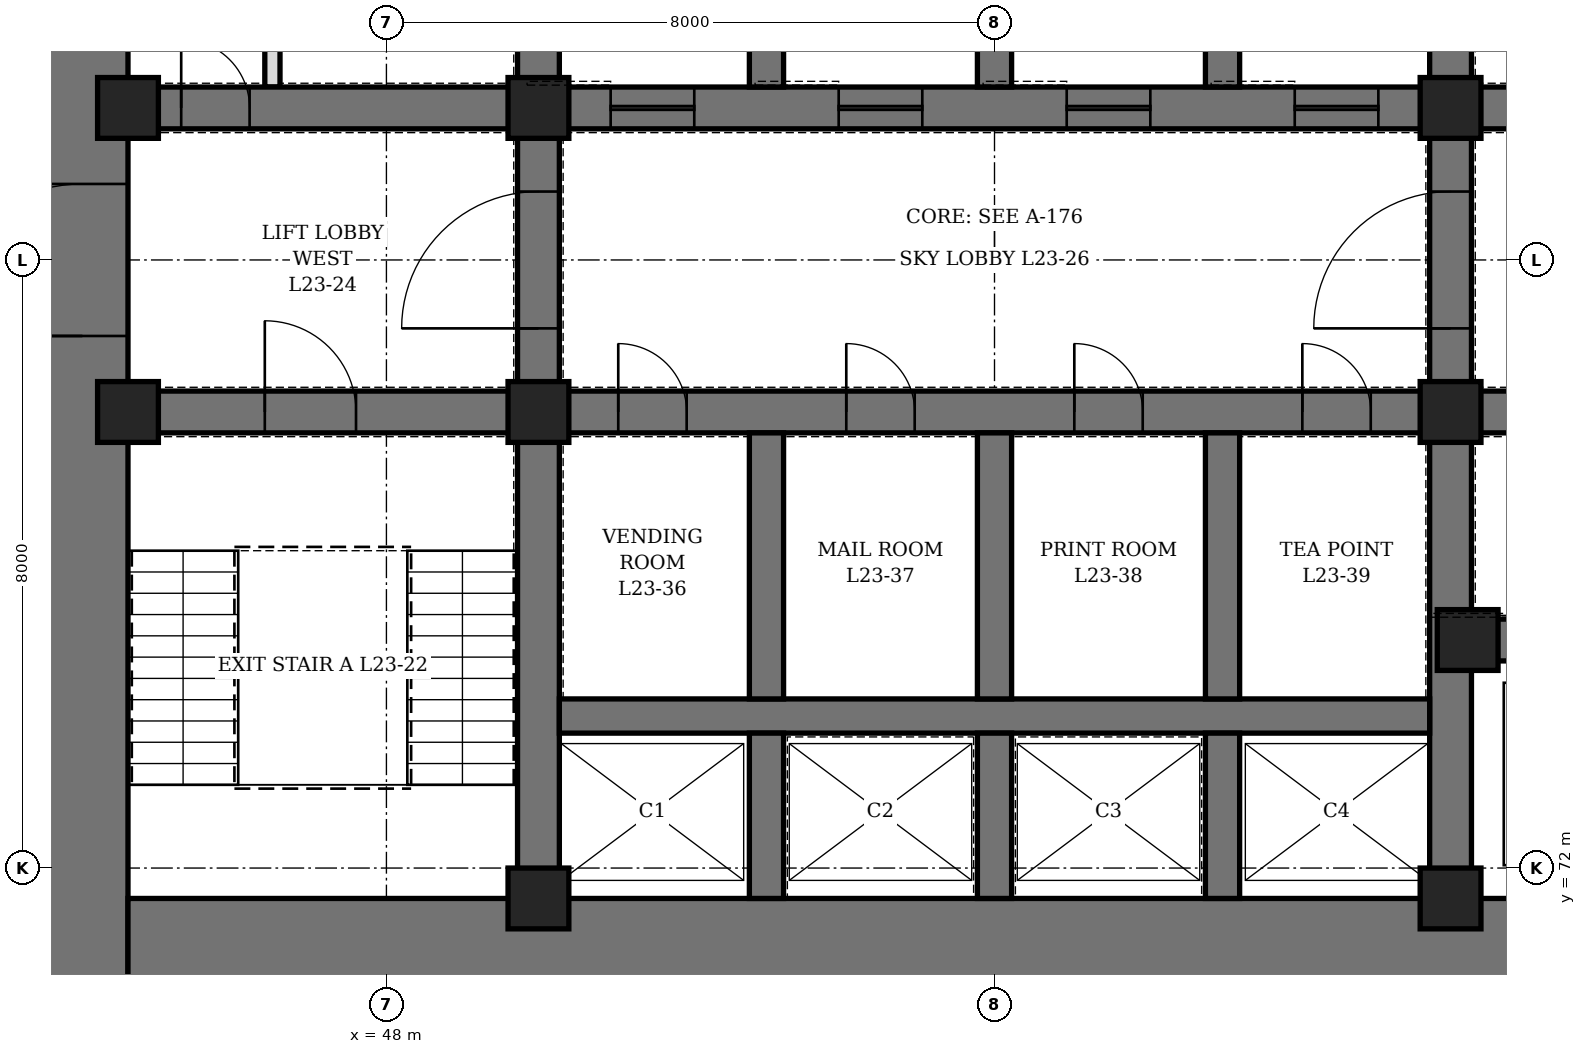
"""IFC4 building model, lengths in metres.
Left out: names, types, materials, properties, quantities, classifications, styles, units other than length and angle.
Written with IfcOpenShell. Run it as: python <this file> out.ifc"""

import sys

from ifc_helpers import new_model, si_unit, direction, frame, frame_2d, origin, origin_2d, place, context, subcontext, project, spatial, rectangle, hollow_rectangle, extrude, element, fill, save


model = new_model("IFC4")
c1 = context("Model", 3, precision=1e-05, world=origin(), true_north=direction((0.0, 1.0)))
c2 = subcontext(c1, "Body", "Model", "MODEL_VIEW")
j1 = project(units=[si_unit("LENGTHUNIT", "METRE"), si_unit("PLANEANGLEUNIT", "RADIAN")], contexts=[c1])
p1 = place(None, origin())
s1 = spatial("IfcSite", under=j1, at=p1, CompositionType="ELEMENT")
p2 = place(p1, origin())
s2 = spatial("IfcBuilding", under=s1, at=p2, CompositionType="ELEMENT")
p3 = place(p2, frame((0.0, 0.0, 108.1)))
s3 = spatial("IfcBuildingStorey", under=s2, at=p3, CompositionType="ELEMENT", Elevation=108.1)
p4 = place(p3, frame((44.0, 70.4, 0.0), z_axis=(0.0, 0.0, 1.0), x_axis=(0.0, 1.0, 0.0)))
e1 = element("IfcWall", 1, at=p4, inside=s3, PredefinedType="SHEAR", context=c2, shape_type="SweptSolid", body=[
    extrude(rectangle(XDim=19.2, YDim=1.2, at=frame_2d((9.6, 0.0))), origin(), (0.0, 0.0, 1.0), 4.2),
])
p5 = place(p4, frame((8.6, 0.0, 0.0)))
e2 = element("IfcOpeningElement", 2, at=p5, cuts=e1, PredefinedType="OPENING", context=c2, shape_type="SweptSolid", body=[
    extrude(rectangle(XDim=2.0, YDim=2.4, at=frame_2d((1.0, 1.2))), frame((0.0, 0.61, 0.0), z_axis=(0.0, -1.0, 0.0), x_axis=(1.0, 0.0, 0.0)), (0.0, 0.0, 1.0), 1.22),
])
p6 = place(p3, frame((44.6, 71.0, 0.0), z_axis=(0.0, 0.0, 1.0), x_axis=(1.0, 0.0, 0.0)))
e3 = element("IfcWall", 3, at=p6, inside=s3, PredefinedType="SHEAR", context=c2, shape_type="SweptSolid", body=[
    extrude(rectangle(XDim=22.8, YDim=1.2, at=frame_2d((11.4, 0.0))), origin(), (0.0, 0.0, 1.0), 4.2),
])
p7 = place(p3, frame((50.0, 71.6, 0.0), z_axis=(0.0, 0.0, 1.0), x_axis=(0.0, 1.0, 0.0)))
e4 = element("IfcWall", 4, at=p7, inside=s3, PredefinedType="SHEAR", context=c2, shape_type="SweptSolid", body=[
    extrude(rectangle(XDim=16.8, YDim=0.55, at=frame_2d((8.4, 0.0))), origin(), (0.0, 0.0, 1.0), 4.2),
])
p8 = place(p7, frame((7.5, 0.0, 0.0)))
e5 = element("IfcOpeningElement", 5, at=p8, cuts=e4, PredefinedType="OPENING", context=c2, shape_type="SweptSolid", body=[
    extrude(rectangle(XDim=1.8, YDim=2.4, at=frame_2d((0.9, 1.2))), frame((0.0, 0.285, 0.0), z_axis=(0.0, -1.0, 0.0), x_axis=(1.0, 0.0, 0.0)), (0.0, 0.0, 1.0), 0.57),
])
p9 = place(p3, frame((62.0, 71.6, 0.0), z_axis=(0.0, 0.0, 1.0), x_axis=(0.0, 1.0, 0.0)))
e6 = element("IfcWall", 6, at=p9, inside=s3, PredefinedType="SHEAR", context=c2, shape_type="SweptSolid", body=[
    extrude(rectangle(XDim=16.8, YDim=0.55, at=frame_2d((8.4, 0.0))), origin(), (0.0, 0.0, 1.0), 4.2),
])
p10 = place(p9, frame((7.5, 0.0, 0.0)))
e7 = element("IfcOpeningElement", 7, at=p10, cuts=e6, PredefinedType="OPENING", context=c2, shape_type="SweptSolid", body=[
    extrude(rectangle(XDim=1.8, YDim=2.4, at=frame_2d((0.9, 1.2))), frame((0.0, 0.285, 0.0), z_axis=(0.0, -1.0, 0.0), x_axis=(1.0, 0.0, 0.0)), (0.0, 0.0, 1.0), 0.57),
])
p11 = place(p3, frame((44.6, 78.0, 0.0), z_axis=(0.0, 0.0, 1.0), x_axis=(1.0, 0.0, 0.0)))
e8 = element("IfcWall", 8, at=p11, inside=s3, PredefinedType="SHEAR", context=c2, shape_type="SweptSolid", body=[
    extrude(rectangle(XDim=5.125, YDim=0.55, at=frame_2d((2.562, 0.0))), origin(), (0.0, 0.0, 1.0), 4.2),
])
p12 = place(p11, frame((1.8, 0.0, 0.0)))
e9 = element("IfcOpeningElement", 9, at=p12, cuts=e8, PredefinedType="OPENING", context=c2, shape_type="SweptSolid", body=[
    extrude(rectangle(XDim=1.2, YDim=2.1, at=frame_2d((0.6, 1.05))), frame((0.0, 0.285, 0.0), z_axis=(0.0, -1.0, 0.0), x_axis=(1.0, 0.0, 0.0)), (0.0, 0.0, 1.0), 0.57),
])
p13 = place(p3, frame((44.6, 82.0, 0.0), z_axis=(0.0, 0.0, 1.0), x_axis=(1.0, 0.0, 0.0)))
e10 = element("IfcWall", 10, at=p13, inside=s3, PredefinedType="SHEAR", context=c2, shape_type="SweptSolid", body=[
    extrude(rectangle(XDim=5.125, YDim=0.55, at=frame_2d((2.562, 0.0))), origin(), (0.0, 0.0, 1.0), 4.2),
])
p14 = place(p13, frame((0.7, 0.0, 0.0)))
e11 = element("IfcOpeningElement", 11, at=p14, cuts=e10, PredefinedType="OPENING", context=c2, shape_type="SweptSolid", body=[
    extrude(rectangle(XDim=0.9, YDim=2.1, at=frame_2d((0.45, 1.05))), frame((0.0, 0.285, 0.0), z_axis=(0.0, -1.0, 0.0), x_axis=(1.0, 0.0, 0.0)), (0.0, 0.0, 1.0), 0.57),
])
p15 = place(p3, frame((62.275, 75.0, 0.0), z_axis=(0.0, 0.0, 1.0), x_axis=(1.0, 0.0, 0.0)))
e12 = element("IfcWall", 12, at=p15, inside=s3, PredefinedType="SHEAR", context=c2, shape_type="SweptSolid", body=[
    extrude(rectangle(XDim=5.125, YDim=0.55, at=frame_2d((2.562, 0.0))), origin(), (0.0, 0.0, 1.0), 4.2),
])
p16 = place(p15, frame((0.625, 0.0, 0.0)))
e13 = element("IfcOpeningElement", 13, at=p16, cuts=e12, PredefinedType="OPENING", context=c2, shape_type="SweptSolid", body=[
    extrude(rectangle(XDim=1.2, YDim=2.2, at=frame_2d((0.6, 1.1))), frame((0.0, 0.285, 0.0), z_axis=(0.0, -1.0, 0.0), x_axis=(1.0, 0.0, 0.0)), (0.0, 0.0, 1.0), 0.57),
])
p17 = place(p15, frame((3.375, 0.0, 0.0)))
e14 = element("IfcOpeningElement", 14, at=p17, cuts=e12, PredefinedType="OPENING", context=c2, shape_type="SweptSolid", body=[
    extrude(rectangle(XDim=1.2, YDim=2.2, at=frame_2d((0.6, 1.1))), frame((0.0, 0.285, 0.0), z_axis=(0.0, -1.0, 0.0), x_axis=(1.0, 0.0, 0.0)), (0.0, 0.0, 1.0), 0.57),
])
p18 = place(p3, frame((62.275, 78.0, 0.0), z_axis=(0.0, 0.0, 1.0), x_axis=(1.0, 0.0, 0.0)))
e15 = element("IfcWall", 15, at=p18, inside=s3, PredefinedType="SHEAR", context=c2, shape_type="SweptSolid", body=[
    extrude(rectangle(XDim=5.125, YDim=0.55, at=frame_2d((2.562, 0.0))), origin(), (0.0, 0.0, 1.0), 4.2),
])
p19 = place(p18, frame((2.125, 0.0, 0.0)))
e16 = element("IfcOpeningElement", 16, at=p19, cuts=e15, PredefinedType="OPENING", context=c2, shape_type="SweptSolid", body=[
    extrude(rectangle(XDim=1.2, YDim=2.1, at=frame_2d((0.6, 1.05))), frame((0.0, 0.285, 0.0), z_axis=(0.0, -1.0, 0.0), x_axis=(1.0, 0.0, 0.0)), (0.0, 0.0, 1.0), 0.57),
])
p20 = place(p3, frame((62.275, 82.0, 0.0), z_axis=(0.0, 0.0, 1.0), x_axis=(1.0, 0.0, 0.0)))
e17 = element("IfcWall", 17, at=p20, inside=s3, PredefinedType="SHEAR", context=c2, shape_type="SweptSolid", body=[
    extrude(rectangle(XDim=5.125, YDim=0.55, at=frame_2d((2.562, 0.0))), origin(), (0.0, 0.0, 1.0), 4.2),
])
p21 = place(p20, frame((2.125, 0.0, 0.0)))
e18 = element("IfcOpeningElement", 18, at=p21, cuts=e17, PredefinedType="OPENING", context=c2, shape_type="SweptSolid", body=[
    extrude(rectangle(XDim=1.2, YDim=2.1, at=frame_2d((0.6, 1.05))), frame((0.0, 0.285, 0.0), z_axis=(0.0, -1.0, 0.0), x_axis=(1.0, 0.0, 0.0)), (0.0, 0.0, 1.0), 0.57),
])
p22 = place(p3, frame((50.275, 78.0, 0.0), z_axis=(0.0, 0.0, 1.0), x_axis=(1.0, 0.0, 0.0)))
e19 = element("IfcWall", 19, at=p22, inside=s3, PredefinedType="SHEAR", context=c2, shape_type="SweptSolid", body=[
    extrude(rectangle(XDim=11.45, YDim=0.55, at=frame_2d((5.725, 0.0))), origin(), (0.0, 0.0, 1.0), 4.2),
])
p23 = place(p22, frame((0.775, 0.0, 0.0)))
e20 = element("IfcOpeningElement", 20, at=p23, cuts=e19, PredefinedType="OPENING", context=c2, shape_type="SweptSolid", body=[
    extrude(rectangle(XDim=0.9, YDim=2.1, at=frame_2d((0.45, 1.05))), frame((0.0, 0.285, 0.0), z_axis=(0.0, -1.0, 0.0), x_axis=(1.0, 0.0, 0.0)), (0.0, 0.0, 1.0), 0.57),
])
p24 = place(p22, frame((3.775, 0.0, 0.0)))
e21 = element("IfcOpeningElement", 21, at=p24, cuts=e19, PredefinedType="OPENING", context=c2, shape_type="SweptSolid", body=[
    extrude(rectangle(XDim=0.9, YDim=2.1, at=frame_2d((0.45, 1.05))), frame((0.0, 0.285, 0.0), z_axis=(0.0, -1.0, 0.0), x_axis=(1.0, 0.0, 0.0)), (0.0, 0.0, 1.0), 0.57),
])
p25 = place(p22, frame((6.775, 0.0, 0.0)))
e22 = element("IfcOpeningElement", 22, at=p25, cuts=e19, PredefinedType="OPENING", context=c2, shape_type="SweptSolid", body=[
    extrude(rectangle(XDim=0.9, YDim=2.1, at=frame_2d((0.45, 1.05))), frame((0.0, 0.285, 0.0), z_axis=(0.0, -1.0, 0.0), x_axis=(1.0, 0.0, 0.0)), (0.0, 0.0, 1.0), 0.57),
])
p26 = place(p22, frame((9.775, 0.0, 0.0)))
e23 = element("IfcOpeningElement", 23, at=p26, cuts=e19, PredefinedType="OPENING", context=c2, shape_type="SweptSolid", body=[
    extrude(rectangle(XDim=0.9, YDim=2.1, at=frame_2d((0.45, 1.05))), frame((0.0, 0.285, 0.0), z_axis=(0.0, -1.0, 0.0), x_axis=(1.0, 0.0, 0.0)), (0.0, 0.0, 1.0), 0.57),
])
p27 = place(p3, frame((50.275, 82.0, 0.0), z_axis=(0.0, 0.0, 1.0), x_axis=(1.0, 0.0, 0.0)))
e24 = element("IfcWall", 24, at=p27, inside=s3, PredefinedType="SHEAR", context=c2, shape_type="SweptSolid", body=[
    extrude(rectangle(XDim=11.45, YDim=0.55, at=frame_2d((5.725, 0.0))), origin(), (0.0, 0.0, 1.0), 4.2),
])
p28 = place(p27, frame((0.675, 0.0, 0.0)))
e25 = element("IfcOpeningElement", 25, at=p28, cuts=e24, PredefinedType="OPENING", context=c2, shape_type="SweptSolid", body=[
    extrude(rectangle(XDim=1.1, YDim=2.2, at=frame_2d((0.55, 1.1))), frame((0.0, 0.285, 0.0), z_axis=(0.0, -1.0, 0.0), x_axis=(1.0, 0.0, 0.0)), (0.0, 0.0, 1.0), 0.57),
])
p29 = place(p27, frame((3.675, 0.0, 0.0)))
e26 = element("IfcOpeningElement", 26, at=p29, cuts=e24, PredefinedType="OPENING", context=c2, shape_type="SweptSolid", body=[
    extrude(rectangle(XDim=1.1, YDim=2.2, at=frame_2d((0.55, 1.1))), frame((0.0, 0.285, 0.0), z_axis=(0.0, -1.0, 0.0), x_axis=(1.0, 0.0, 0.0)), (0.0, 0.0, 1.0), 0.57),
])
p30 = place(p27, frame((6.675, 0.0, 0.0)))
e27 = element("IfcOpeningElement", 27, at=p30, cuts=e24, PredefinedType="OPENING", context=c2, shape_type="SweptSolid", body=[
    extrude(rectangle(XDim=1.1, YDim=2.2, at=frame_2d((0.55, 1.1))), frame((0.0, 0.285, 0.0), z_axis=(0.0, -1.0, 0.0), x_axis=(1.0, 0.0, 0.0)), (0.0, 0.0, 1.0), 0.57),
])
p31 = place(p27, frame((9.675, 0.0, 0.0)))
e28 = element("IfcOpeningElement", 28, at=p31, cuts=e24, PredefinedType="OPENING", context=c2, shape_type="SweptSolid", body=[
    extrude(rectangle(XDim=1.1, YDim=2.2, at=frame_2d((0.55, 1.1))), frame((0.0, 0.285, 0.0), z_axis=(0.0, -1.0, 0.0), x_axis=(1.0, 0.0, 0.0)), (0.0, 0.0, 1.0), 0.57),
])
p32 = place(p3, frame((50.275, 74.0, 0.0), z_axis=(0.0, 0.0, 1.0), x_axis=(1.0, 0.0, 0.0)))
e29 = element("IfcWall", 29, at=p32, inside=s3, PredefinedType="SHEAR", context=c2, shape_type="SweptSolid", body=[
    extrude(rectangle(XDim=11.45, YDim=0.45, at=frame_2d((5.725, 0.0))), origin(), (0.0, 0.0, 1.0), 4.2),
])
p33 = place(p3, frame((53.0, 71.6, 0.0), z_axis=(0.0, 0.0, 1.0), x_axis=(0.0, 1.0, 0.0)))
e30 = element("IfcWall", 30, at=p33, inside=s3, PredefinedType="SHEAR", context=c2, shape_type="SweptSolid", body=[
    extrude(rectangle(XDim=2.175, YDim=0.45, at=frame_2d((1.087, 0.0))), origin(), (0.0, 0.0, 1.0), 4.2),
])
p34 = place(p3, frame((53.0, 74.225, 0.0), z_axis=(0.0, 0.0, 1.0), x_axis=(0.0, 1.0, 0.0)))
e31 = element("IfcWall", 31, at=p34, inside=s3, PredefinedType="SHEAR", context=c2, shape_type="SweptSolid", body=[
    extrude(rectangle(XDim=3.5, YDim=0.45, at=frame_2d((1.75, 0.0))), origin(), (0.0, 0.0, 1.0), 4.2),
])
p35 = place(p3, frame((53.0, 82.275, 0.0), z_axis=(0.0, 0.0, 1.0), x_axis=(0.0, 1.0, 0.0)))
e32 = element("IfcWall", 32, at=p35, inside=s3, PredefinedType="SHEAR", context=c2, shape_type="SweptSolid", body=[
    extrude(rectangle(XDim=3.45, YDim=0.45, at=frame_2d((1.725, 0.0))), origin(), (0.0, 0.0, 1.0), 4.2),
])
p36 = place(p3, frame((56.0, 71.6, 0.0), z_axis=(0.0, 0.0, 1.0), x_axis=(0.0, 1.0, 0.0)))
e33 = element("IfcWall", 33, at=p36, inside=s3, PredefinedType="SHEAR", context=c2, shape_type="SweptSolid", body=[
    extrude(rectangle(XDim=2.175, YDim=0.45, at=frame_2d((1.087, 0.0))), origin(), (0.0, 0.0, 1.0), 4.2),
])
p37 = place(p3, frame((56.0, 74.225, 0.0), z_axis=(0.0, 0.0, 1.0), x_axis=(0.0, 1.0, 0.0)))
e34 = element("IfcWall", 34, at=p37, inside=s3, PredefinedType="SHEAR", context=c2, shape_type="SweptSolid", body=[
    extrude(rectangle(XDim=3.5, YDim=0.45, at=frame_2d((1.75, 0.0))), origin(), (0.0, 0.0, 1.0), 4.2),
])
p38 = place(p3, frame((56.0, 82.275, 0.0), z_axis=(0.0, 0.0, 1.0), x_axis=(0.0, 1.0, 0.0)))
e35 = element("IfcWall", 35, at=p38, inside=s3, PredefinedType="SHEAR", context=c2, shape_type="SweptSolid", body=[
    extrude(rectangle(XDim=3.45, YDim=0.45, at=frame_2d((1.725, 0.0))), origin(), (0.0, 0.0, 1.0), 4.2),
])
p39 = place(p3, frame((59.0, 71.6, 0.0), z_axis=(0.0, 0.0, 1.0), x_axis=(0.0, 1.0, 0.0)))
e36 = element("IfcWall", 36, at=p39, inside=s3, PredefinedType="SHEAR", context=c2, shape_type="SweptSolid", body=[
    extrude(rectangle(XDim=2.175, YDim=0.45, at=frame_2d((1.087, 0.0))), origin(), (0.0, 0.0, 1.0), 4.2),
])
p40 = place(p3, frame((59.0, 74.225, 0.0), z_axis=(0.0, 0.0, 1.0), x_axis=(0.0, 1.0, 0.0)))
e37 = element("IfcWall", 37, at=p40, inside=s3, PredefinedType="SHEAR", context=c2, shape_type="SweptSolid", body=[
    extrude(rectangle(XDim=3.5, YDim=0.45, at=frame_2d((1.75, 0.0))), origin(), (0.0, 0.0, 1.0), 4.2),
])
p41 = place(p3, frame((59.0, 82.275, 0.0), z_axis=(0.0, 0.0, 1.0), x_axis=(0.0, 1.0, 0.0)))
e38 = element("IfcWall", 38, at=p41, inside=s3, PredefinedType="SHEAR", context=c2, shape_type="SweptSolid", body=[
    extrude(rectangle(XDim=3.45, YDim=0.45, at=frame_2d((1.725, 0.0))), origin(), (0.0, 0.0, 1.0), 4.2),
])
for number, where, z_axis, x_axis in (
    (39, (44.6, 78.0, 0.0), (0.0, 0.0, 1.0), (1.0, 0.0, 0.0)),
    (40, (44.6, 82.0, 0.0), (0.0, 0.0, 1.0), (1.0, 0.0, 0.0)),
    (41, (50.0, 71.6, 0.0), (0.0, 0.0, 1.0), (1.0, 0.0, 0.0)),
    (42, (50.0, 78.0, 0.0), (0.0, 0.0, 1.0), (1.0, 0.0, 0.0)),
    (43, (50.0, 82.0, 0.0), (0.0, 0.0, 1.0), (1.0, 0.0, 0.0)),
    (44, (62.0, 71.6, 0.0), (0.0, 0.0, 1.0), (1.0, 0.0, 0.0)),
    (45, (62.0, 78.0, 0.0), (0.0, 0.0, 1.0), (1.0, 0.0, 0.0)),
    (46, (62.0, 82.0, 0.0), (0.0, 0.0, 1.0), (1.0, 0.0, 0.0)),
    (47, (62.225, 75.0, 0.0), (0.0, 0.0, 1.0), (1.0, 0.0, 0.0)),
):
    element("IfcColumn", number, at=place(p3, frame(where, z_axis=z_axis, x_axis=x_axis)), inside=s3, PredefinedType="COLUMN", context=c2, shape_type="SweptSolid", body=[
        extrude(hollow_rectangle(XDim=0.8, YDim=0.8, WallThickness=0.1, at=origin_2d()), origin(), (0.0, 0.0, 1.0), 4.2),
    ])
p42 = place(p3, frame((46.5, 82.275, 0.0), z_axis=(0.0, 0.0, 1.0), x_axis=(0.0, 1.0, 0.0)))
e48 = element("IfcWall", 48, at=p42, inside=s3, PredefinedType="PARTITIONING", context=c2, shape_type="SweptSolid", body=[
    extrude(rectangle(XDim=2.95, YDim=0.2, at=frame_2d((1.475, 0.0))), origin(), (0.0, 0.0, 1.0), 4.04),
])
p43 = place(p42, frame((1.025, 0.0, 0.0)))
e49 = element("IfcOpeningElement", 49, at=p43, cuts=e48, PredefinedType="OPENING", context=c2, shape_type="SweptSolid", body=[
    extrude(rectangle(XDim=0.9, YDim=2.1, at=frame_2d((0.45, 1.05))), frame((0.0, 0.11, 0.0), z_axis=(0.0, -1.0, 0.0), x_axis=(1.0, 0.0, 0.0)), (0.0, 0.0, 1.0), 0.22),
])
p44 = place(p14, origin())
e50 = element("IfcDoor", 50, at=p44, inside=s3, OperationType="SINGLE_SWING_LEFT", PredefinedType="DOOR", context=c2, shape_type="SweptSolid", body=[
    extrude(rectangle(XDim=0.9, YDim=2.1, at=frame_2d((0.45, 1.05))), frame((0.0, 0.275, 0.0), z_axis=(0.0, -1.0, 0.0), x_axis=(1.0, 0.0, 0.0)), (0.0, 0.0, 1.0), 0.55),
])
fill(e11, e50)
p45 = place(p23, origin())
e51 = element("IfcDoor", 51, at=p45, inside=s3, OperationType="SINGLE_SWING_LEFT", PredefinedType="DOOR", context=c2, shape_type="SweptSolid", body=[
    extrude(rectangle(XDim=0.9, YDim=2.1, at=frame_2d((0.45, 1.05))), frame((0.0, 0.275, 0.0), z_axis=(0.0, -1.0, 0.0), x_axis=(1.0, 0.0, 0.0)), (0.0, 0.0, 1.0), 0.55),
])
fill(e20, e51)
p46 = place(p24, origin())
e52 = element("IfcDoor", 52, at=p46, inside=s3, OperationType="SINGLE_SWING_LEFT", PredefinedType="DOOR", context=c2, shape_type="SweptSolid", body=[
    extrude(rectangle(XDim=0.9, YDim=2.1, at=frame_2d((0.45, 1.05))), frame((0.0, 0.275, 0.0), z_axis=(0.0, -1.0, 0.0), x_axis=(1.0, 0.0, 0.0)), (0.0, 0.0, 1.0), 0.55),
])
fill(e21, e52)
p47 = place(p25, origin())
e53 = element("IfcDoor", 53, at=p47, inside=s3, OperationType="SINGLE_SWING_LEFT", PredefinedType="DOOR", context=c2, shape_type="SweptSolid", body=[
    extrude(rectangle(XDim=0.9, YDim=2.1, at=frame_2d((0.45, 1.05))), frame((0.0, 0.275, 0.0), z_axis=(0.0, -1.0, 0.0), x_axis=(1.0, 0.0, 0.0)), (0.0, 0.0, 1.0), 0.55),
])
fill(e22, e53)
p48 = place(p26, origin())
e54 = element("IfcDoor", 54, at=p48, inside=s3, OperationType="SINGLE_SWING_LEFT", PredefinedType="DOOR", context=c2, shape_type="SweptSolid", body=[
    extrude(rectangle(XDim=0.9, YDim=2.1, at=frame_2d((0.45, 1.05))), frame((0.0, 0.275, 0.0), z_axis=(0.0, -1.0, 0.0), x_axis=(1.0, 0.0, 0.0)), (0.0, 0.0, 1.0), 0.55),
])
fill(e23, e54)
p49 = place(p12, origin())
e55 = element("IfcDoor", 55, at=p49, inside=s3, OperationType="SINGLE_SWING_LEFT", PredefinedType="DOOR", context=c2, shape_type="SweptSolid", body=[
    extrude(rectangle(XDim=1.2, YDim=2.1, at=frame_2d((0.6, 1.05))), frame((0.0, 0.275, 0.0), z_axis=(0.0, -1.0, 0.0), x_axis=(1.0, 0.0, 0.0)), (0.0, 0.0, 1.0), 0.55),
])
fill(e9, e55)
p50 = place(p5, origin())
e56 = element("IfcDoor", 56, at=p50, inside=s3, OperationType="DOUBLE_DOOR_SINGLE_SWING", PredefinedType="DOOR", context=c2, shape_type="SweptSolid", body=[
    extrude(rectangle(XDim=2.0, YDim=2.4, at=frame_2d((1.0, 1.2))), frame((0.0, 0.35, 0.0), z_axis=(0.0, -1.0, 0.0), x_axis=(1.0, 0.0, 0.0)), (0.0, 0.0, 1.0), 0.7),
])
fill(e2, e56)
p51 = place(p8, origin())
e57 = element("IfcDoor", 57, at=p51, inside=s3, OperationType="DOUBLE_DOOR_SINGLE_SWING", PredefinedType="DOOR", context=c2, shape_type="SweptSolid", body=[
    extrude(rectangle(XDim=1.8, YDim=2.4, at=frame_2d((0.9, 1.2))), frame((0.0, 0.275, 0.0), z_axis=(0.0, -1.0, 0.0), x_axis=(1.0, 0.0, 0.0)), (0.0, 0.0, 1.0), 0.55),
])
fill(e5, e57)
p52 = place(p10, origin())
e58 = element("IfcDoor", 58, at=p52, inside=s3, OperationType="DOUBLE_DOOR_SINGLE_SWING", PredefinedType="DOOR", context=c2, shape_type="SweptSolid", body=[
    extrude(rectangle(XDim=1.8, YDim=2.4, at=frame_2d((0.9, 1.2))), frame((0.0, 0.275, 0.0), z_axis=(0.0, -1.0, 0.0), x_axis=(1.0, 0.0, 0.0)), (0.0, 0.0, 1.0), 0.55),
])
fill(e7, e58)
p53 = place(p28, origin())
e59 = element("IfcDoor", 59, at=p53, inside=s3, OperationType="SLIDING_TO_LEFT", PredefinedType="DOOR", context=c2, shape_type="SweptSolid", body=[
    extrude(rectangle(XDim=1.1, YDim=2.2, at=frame_2d((0.55, 1.1))), frame((0.0, 0.275, 0.0), z_axis=(0.0, -1.0, 0.0), x_axis=(1.0, 0.0, 0.0)), (0.0, 0.0, 1.0), 0.55),
])
fill(e25, e59)
p54 = place(p29, origin())
e60 = element("IfcDoor", 60, at=p54, inside=s3, OperationType="SLIDING_TO_LEFT", PredefinedType="DOOR", context=c2, shape_type="SweptSolid", body=[
    extrude(rectangle(XDim=1.1, YDim=2.2, at=frame_2d((0.55, 1.1))), frame((0.0, 0.275, 0.0), z_axis=(0.0, -1.0, 0.0), x_axis=(1.0, 0.0, 0.0)), (0.0, 0.0, 1.0), 0.55),
])
fill(e26, e60)
p55 = place(p30, origin())
e61 = element("IfcDoor", 61, at=p55, inside=s3, OperationType="SLIDING_TO_LEFT", PredefinedType="DOOR", context=c2, shape_type="SweptSolid", body=[
    extrude(rectangle(XDim=1.1, YDim=2.2, at=frame_2d((0.55, 1.1))), frame((0.0, 0.275, 0.0), z_axis=(0.0, -1.0, 0.0), x_axis=(1.0, 0.0, 0.0)), (0.0, 0.0, 1.0), 0.55),
])
fill(e27, e61)
p56 = place(p31, origin())
e62 = element("IfcDoor", 62, at=p56, inside=s3, OperationType="SLIDING_TO_LEFT", PredefinedType="DOOR", context=c2, shape_type="SweptSolid", body=[
    extrude(rectangle(XDim=1.1, YDim=2.2, at=frame_2d((0.55, 1.1))), frame((0.0, 0.275, 0.0), z_axis=(0.0, -1.0, 0.0), x_axis=(1.0, 0.0, 0.0)), (0.0, 0.0, 1.0), 0.55),
])
fill(e28, e62)
save(model, sys.argv[1])
